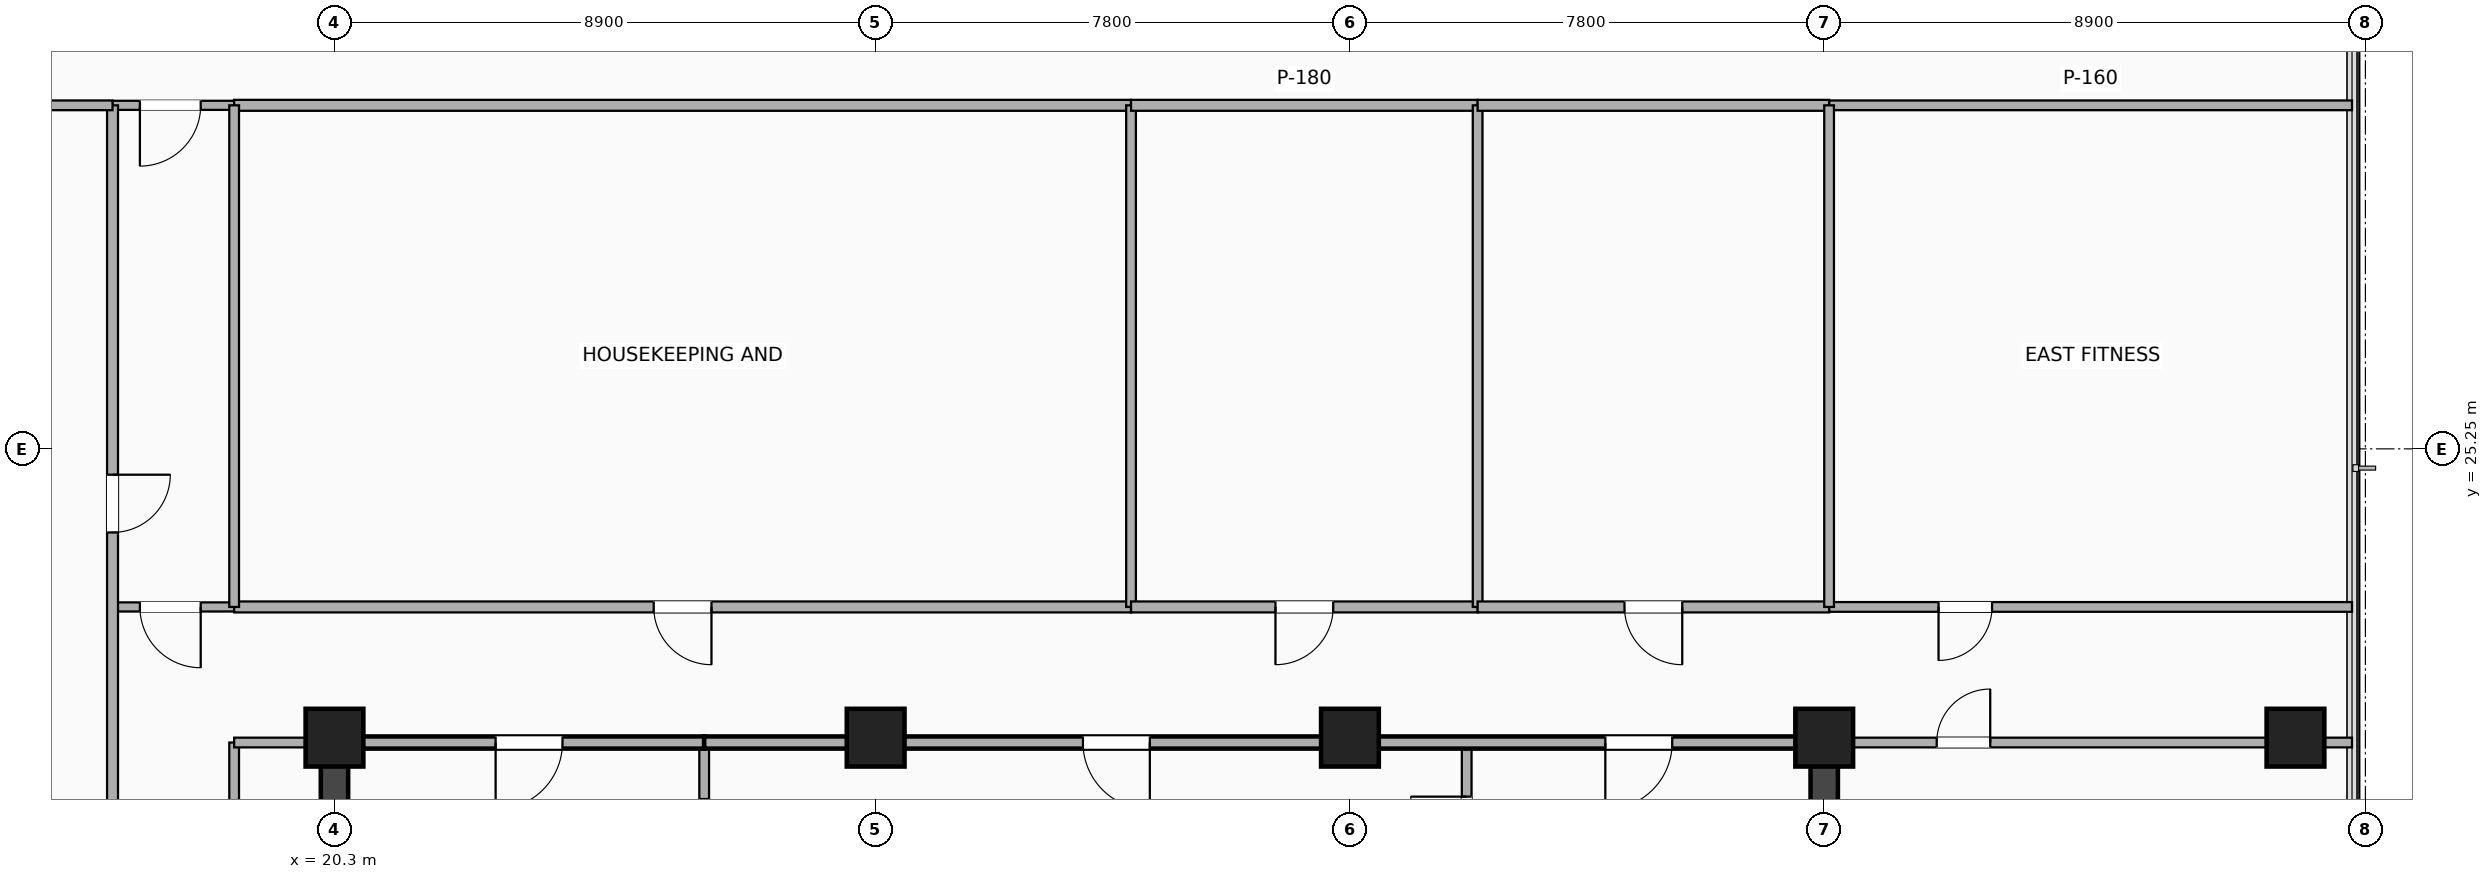
"""IFC4 building model, lengths in metres.
Left out: names, types, materials, properties, quantities, classifications, styles, units other than length and angle.
Written with IfcOpenShell. Run it as: python <this file> out.ifc"""

import sys

from ifc_helpers import new_model, si_unit, direction, frame, frame_2d, origin, origin_2d, place, context, subcontext, project, spatial, rectangle, extrude, element, fill, save


model = new_model("IFC4")
c1 = context("Model", 3, precision=1e-05, world=origin(), true_north=direction((0.0, 1.0)))
c2 = subcontext(c1, "Body", "Model", "MODEL_VIEW")
j1 = project(units=[si_unit("LENGTHUNIT", "METRE"), si_unit("PLANEANGLEUNIT", "RADIAN")], contexts=[c1])
p1 = place(None, origin())
s1 = spatial("IfcSite", under=j1, at=p1, CompositionType="ELEMENT")
p2 = place(p1, origin())
s2 = spatial("IfcBuilding", under=s1, at=p2, CompositionType="ELEMENT")
p3 = place(p2, frame((0.0, 0.0, 224.9)))
s3 = spatial("IfcBuildingStorey", under=s2, at=p3, CompositionType="ELEMENT", Elevation=224.9)
for number, where, z_axis, x_axis in (
    (1, (20.3, 3.5, 0.0), (0.0, 0.0, 1.0), (0.0, 1.0, 0.0)),
    (2, (44.8, 3.5, 0.0), (0.0, 0.0, 1.0), (0.0, 1.0, 0.0)),
):
    element("IfcWall", number, at=place(p3, frame(where, z_axis=z_axis, x_axis=x_axis)), inside=s3, PredefinedType="SHEAR", context=c2, shape_type="SweptSolid", body=[
        extrude(rectangle(XDim=16.9, YDim=0.45, at=frame_2d((8.45, 0.0))), origin(), (0.0, 0.0, 1.0), 3.26),
    ])
for number, where, z_axis, x_axis in (
    (3, (20.3, 20.5, -0.24), (0.0, 0.0, 1.0), (1.0, 0.0, 0.0)),
    (4, (29.2, 20.5, -0.24), (0.0, 0.0, 1.0), (1.0, 0.0, 0.0)),
    (5, (37.0, 20.5, -0.24), (0.0, 0.0, 1.0), (1.0, 0.0, 0.0)),
    (6, (44.8, 20.5, -0.24), (0.0, 0.0, 1.0), (1.0, 0.0, 0.0)),
    (7, (52.55, 20.5, -0.24), (0.0, 0.0, 1.0), (1.0, 0.0, 0.0)),
):
    element("IfcColumn", number, at=place(p3, frame(where, z_axis=z_axis, x_axis=x_axis)), inside=s3, PredefinedType="COLUMN", context=c2, shape_type="SweptSolid", body=[
        extrude(rectangle(XDim=0.95, YDim=0.95, at=origin_2d()), origin(), (0.0, 0.0, 1.0), 3.5),
    ])
p4 = place(p3, frame((26.38, 17.76, 0.0), z_axis=(0.0, 0.0, 1.0), x_axis=(0.0, 1.0, 0.0)))
e8 = element("IfcWall", 8, at=p4, inside=s3, PredefinedType="PARTITIONING", context=c2, shape_type="SweptSolid", body=[
    extrude(rectangle(XDim=2.66, YDim=0.16, at=frame_2d((1.33, 0.0))), origin(), (0.0, 0.0, 1.0), 2.706),
])
p5 = place(p4, frame((0.85, 0.0, 0.0)))
e9 = element("IfcOpeningElement", 9, at=p5, cuts=e8, PredefinedType="OPENING", context=c2, shape_type="SweptSolid", body=[
    extrude(rectangle(XDim=0.88, YDim=2.08, at=frame_2d((0.44, 1.04))), frame((0.0, 0.09, 0.0), z_axis=(0.0, -1.0, 0.0), x_axis=(1.0, 0.0, 0.0)), (0.0, 0.0, 1.0), 0.18),
])
p6 = place(p3, frame((38.92, 17.76, 0.0), z_axis=(0.0, 0.0, 1.0), x_axis=(0.0, 1.0, 0.0)))
e10 = element("IfcWall", 10, at=p6, inside=s3, PredefinedType="PARTITIONING", context=c2, shape_type="SweptSolid", body=[
    extrude(rectangle(XDim=2.66, YDim=0.16, at=frame_2d((1.33, 0.0))), origin(), (0.0, 0.0, 1.0), 2.706),
])
p7 = place(p6, frame((1.77, 0.0, 0.0), z_axis=(0.0, 0.0, 1.0), x_axis=(-1.0, 0.0, 0.0)))
e11 = element("IfcOpeningElement", 11, at=p7, cuts=e10, PredefinedType="OPENING", context=c2, shape_type="SweptSolid", body=[
    extrude(rectangle(XDim=0.92, YDim=2.08, at=frame_2d((0.46, 1.04))), frame((0.0, 0.09, 0.0), z_axis=(0.0, -1.0, 0.0), x_axis=(1.0, 0.0, 0.0)), (0.0, 0.0, 1.0), 0.18),
])
p8 = place(p3, frame((20.65, 20.42, 0.0), z_axis=(0.0, 0.0, 1.0), x_axis=(1.0, 0.0, 0.0)))
e12 = element("IfcWall", 12, at=p8, inside=s3, PredefinedType="PARTITIONING", context=c2, shape_type="SweptSolid", body=[
    extrude(rectangle(XDim=5.73, YDim=0.2, at=frame_2d((2.865, 0.0))), origin(), (0.0, 0.0, 1.0), 2.472),
])
p9 = place(p8, frame((2.3, 0.0, 0.0)))
e13 = element("IfcOpeningElement", 13, at=p9, cuts=e12, PredefinedType="OPENING", context=c2, shape_type="SweptSolid", body=[
    extrude(rectangle(XDim=1.1, YDim=2.15, at=frame_2d((0.55, 1.075))), frame((0.0, 0.11, 0.0), z_axis=(0.0, -1.0, 0.0), x_axis=(1.0, 0.0, 0.0)), (0.0, 0.0, 1.0), 0.22),
])
p10 = place(p3, frame((26.38, 20.42, 0.0), z_axis=(0.0, 0.0, 1.0), x_axis=(1.0, 0.0, 0.0)))
e14 = element("IfcWall", 14, at=p10, inside=s3, PredefinedType="PARTITIONING", context=c2, shape_type="SweptSolid", body=[
    extrude(rectangle(XDim=2.82, YDim=0.2, at=frame_2d((1.41, 0.0))), origin(), (0.0, 0.0, 1.0), 2.472),
])
p11 = place(p3, frame((29.2, 20.42, 0.0), z_axis=(0.0, 0.0, 1.0), x_axis=(1.0, 0.0, 0.0)))
e15 = element("IfcWall", 15, at=p11, inside=s3, PredefinedType="PARTITIONING", context=c2, shape_type="SweptSolid", body=[
    extrude(rectangle(XDim=7.8, YDim=0.2, at=frame_2d((3.9, 0.0))), origin(), (0.0, 0.0, 1.0), 2.472),
])
p12 = place(p11, frame((3.409, 0.0, 0.0)))
e16 = element("IfcOpeningElement", 16, at=p12, cuts=e15, PredefinedType="OPENING", context=c2, shape_type="SweptSolid", body=[
    extrude(rectangle(XDim=1.1, YDim=2.15, at=frame_2d((0.55, 1.075))), frame((0.0, 0.11, 0.0), z_axis=(0.0, -1.0, 0.0), x_axis=(1.0, 0.0, 0.0)), (0.0, 0.0, 1.0), 0.22),
])
p13 = place(p3, frame((37.0, 20.42, 0.0), z_axis=(0.0, 0.0, 1.0), x_axis=(1.0, 0.0, 0.0)))
e17 = element("IfcWall", 17, at=p13, inside=s3, PredefinedType="PARTITIONING", context=c2, shape_type="SweptSolid", body=[
    extrude(rectangle(XDim=7.45, YDim=0.2, at=frame_2d((3.725, 0.0))), origin(), (0.0, 0.0, 1.0), 2.472),
])
p14 = place(p13, frame((4.2, 0.0, 0.0)))
e18 = element("IfcOpeningElement", 18, at=p14, cuts=e17, PredefinedType="OPENING", context=c2, shape_type="SweptSolid", body=[
    extrude(rectangle(XDim=1.1, YDim=2.15, at=frame_2d((0.55, 1.075))), frame((0.0, 0.11, 0.0), z_axis=(0.0, -1.0, 0.0), x_axis=(1.0, 0.0, 0.0)), (0.0, 0.0, 1.0), 0.22),
])
p15 = place(p3, frame((18.65, 15.65, 0.0), z_axis=(0.0, 0.0, 1.0), x_axis=(0.0, 1.0, 0.0)))
e19 = element("IfcWall", 19, at=p15, inside=s3, PredefinedType="PARTITIONING", context=c2, shape_type="SweptSolid", body=[
    extrude(rectangle(XDim=4.77, YDim=0.16, at=frame_2d((2.385, 0.0))), origin(), (0.0, 0.0, 1.0), 2.472),
])
p16 = place(p15, frame((1.28, 0.0, 0.0), z_axis=(0.0, 0.0, 1.0), x_axis=(-1.0, 0.0, 0.0)))
e20 = element("IfcOpeningElement", 20, at=p16, cuts=e19, PredefinedType="OPENING", context=c2, shape_type="SweptSolid", body=[
    extrude(rectangle(XDim=0.88, YDim=2.08, at=frame_2d((0.44, 1.04))), frame((0.0, 0.09, 0.0), z_axis=(0.0, -1.0, 0.0), x_axis=(1.0, 0.0, 0.0)), (0.0, 0.0, 1.0), 0.18),
])
p17 = place(p3, frame((18.65, 20.42, 0.0), z_axis=(0.0, 0.0, 1.0), x_axis=(1.0, 0.0, 0.0)))
e21 = element("IfcWall", 21, at=p17, inside=s3, PredefinedType="PARTITIONING", context=c2, shape_type="SweptSolid", body=[
    extrude(rectangle(XDim=1.65, YDim=0.16, at=frame_2d((0.825, 0.0))), origin(), (0.0, 0.0, 1.0), 2.472),
])
p18 = place(p3, frame((16.65, 22.65, 0.0), z_axis=(0.0, 0.0, 1.0), x_axis=(1.0, 0.0, 0.0)))
e22 = element("IfcWall", 22, at=p18, inside=s3, PredefinedType="PARTITIONING", context=c2, shape_type="SweptSolid", body=[
    extrude(rectangle(XDim=2.0, YDim=0.15, at=frame_2d((1.0, 0.0))), origin(), (0.0, 0.0, 1.0), 3.26),
])
p19 = place(p18, frame((0.45, 0.0, 0.0)))
e23 = element("IfcOpeningElement", 23, at=p19, cuts=e22, PredefinedType="OPENING", context=c2, shape_type="SweptSolid", body=[
    extrude(rectangle(XDim=1.0, YDim=2.15, at=frame_2d((0.5, 1.075))), frame((0.0, 0.085, 0.0), z_axis=(0.0, -1.0, 0.0), x_axis=(1.0, 0.0, 0.0)), (0.0, 0.0, 1.0), 0.17),
])
p20 = place(p3, frame((16.65, 30.9, 0.0), z_axis=(0.0, 0.0, 1.0), x_axis=(1.0, 0.0, 0.0)))
e24 = element("IfcWall", 24, at=p20, inside=s3, PredefinedType="PARTITIONING", context=c2, shape_type="SweptSolid", body=[
    extrude(rectangle(XDim=2.0, YDim=0.15, at=frame_2d((1.0, 0.0))), origin(), (0.0, 0.0, 1.0), 3.26),
])
p21 = place(p20, frame((0.45, 0.0, 0.0)))
e25 = element("IfcOpeningElement", 25, at=p21, cuts=e24, PredefinedType="OPENING", context=c2, shape_type="SweptSolid", body=[
    extrude(rectangle(XDim=1.0, YDim=2.15, at=frame_2d((0.5, 1.075))), frame((0.0, 0.085, 0.0), z_axis=(0.0, -1.0, 0.0), x_axis=(1.0, 0.0, 0.0)), (0.0, 0.0, 1.0), 0.17),
])
p22 = place(p3, frame((44.8, 20.42, 0.0), z_axis=(0.0, 0.0, 1.0), x_axis=(1.0, 0.0, 0.0)))
e26 = element("IfcWall", 26, at=p22, inside=s3, PredefinedType="PARTITIONING", context=c2, shape_type="SweptSolid", body=[
    extrude(rectangle(XDim=8.68, YDim=0.16, at=frame_2d((4.34, 0.0))), origin(), (0.0, 0.0, 1.0), 2.472),
])
p23 = place(p22, frame((2.73, 0.0, 0.0), z_axis=(0.0, 0.0, 1.0), x_axis=(-1.0, 0.0, 0.0)))
e27 = element("IfcOpeningElement", 27, at=p23, cuts=e26, PredefinedType="OPENING", context=c2, shape_type="SweptSolid", body=[
    extrude(rectangle(XDim=0.88, YDim=2.08, at=frame_2d((0.44, 1.04))), frame((0.0, 0.09, 0.0), z_axis=(0.0, -1.0, 0.0), x_axis=(1.0, 0.0, 0.0)), (0.0, 0.0, 1.0), 0.18),
])
p24 = place(p3, frame((44.88, 22.65, 0.0), z_axis=(0.0, 0.0, 1.0), x_axis=(1.0, 0.0, 0.0)))
e28 = element("IfcWall", 28, at=p24, inside=s3, PredefinedType="PARTITIONING", context=c2, shape_type="SweptSolid", body=[
    extrude(rectangle(XDim=8.6, YDim=0.16, at=frame_2d((4.3, 0.0))), origin(), (0.0, 0.0, 1.0), 2.472),
])
p25 = place(p24, frame((1.8, 0.0, 0.0)))
e29 = element("IfcOpeningElement", 29, at=p25, cuts=e28, PredefinedType="OPENING", context=c2, shape_type="SweptSolid", body=[
    extrude(rectangle(XDim=0.88, YDim=2.08, at=frame_2d((0.44, 1.04))), frame((0.0, 0.09, 0.0), z_axis=(0.0, -1.0, 0.0), x_axis=(1.0, 0.0, 0.0)), (0.0, 0.0, 1.0), 0.18),
])
p26 = place(p3, frame((44.88, 30.9, 0.0), z_axis=(0.0, 0.0, 1.0), x_axis=(1.0, 0.0, 0.0)))
e30 = element("IfcWall", 30, at=p26, inside=s3, PredefinedType="PARTITIONING", context=c2, shape_type="SweptSolid", body=[
    extrude(rectangle(XDim=8.6, YDim=0.16, at=frame_2d((4.3, 0.0))), origin(), (0.0, 0.0, 1.0), 2.472),
])
p27 = place(p3, frame((18.65, 22.65, 0.0), z_axis=(0.0, 0.0, 1.0), x_axis=(1.0, 0.0, 0.0)))
e31 = element("IfcWall", 31, at=p27, inside=s3, PredefinedType="PARTITIONING", context=c2, shape_type="SweptSolid", body=[
    extrude(rectangle(XDim=14.75, YDim=0.18, at=frame_2d((7.375, 0.0))), origin(), (0.0, 0.0, 1.0), 2.472),
])
p28 = place(p27, frame((6.9, 0.0, 0.0)))
e32 = element("IfcOpeningElement", 32, at=p28, cuts=e31, PredefinedType="OPENING", context=c2, shape_type="SweptSolid", body=[
    extrude(rectangle(XDim=0.95, YDim=2.15, at=frame_2d((0.475, 1.075))), frame((0.0, 0.1, 0.0), z_axis=(0.0, -1.0, 0.0), x_axis=(1.0, 0.0, 0.0)), (0.0, 0.0, 1.0), 0.2),
])
p29 = place(p3, frame((18.65, 30.9, 0.0), z_axis=(0.0, 0.0, 1.0), x_axis=(1.0, 0.0, 0.0)))
e33 = element("IfcWall", 33, at=p29, inside=s3, PredefinedType="PARTITIONING", context=c2, shape_type="SweptSolid", body=[
    extrude(rectangle(XDim=14.75, YDim=0.18, at=frame_2d((7.375, 0.0))), origin(), (0.0, 0.0, 1.0), 2.472),
])
for number, where, z_axis, x_axis in (
    (34, (18.65, 22.65, 0.0), (0.0, 0.0, 1.0), (0.0, 1.0, 0.0)),
    (35, (33.4, 22.65, 0.0), (0.0, 0.0, 1.0), (0.0, 1.0, 0.0)),
):
    element("IfcWall", number, at=place(p3, frame(where, z_axis=z_axis, x_axis=x_axis)), inside=s3, PredefinedType="PARTITIONING", context=c2, shape_type="SweptSolid", body=[
        extrude(rectangle(XDim=8.25, YDim=0.16, at=frame_2d((4.125, 0.0))), origin(), (0.0, 0.0, 1.0), 2.887),
    ])
p30 = place(p3, frame((33.4, 22.65, 0.0), z_axis=(0.0, 0.0, 1.0), x_axis=(1.0, 0.0, 0.0)))
e36 = element("IfcWall", 36, at=p30, inside=s3, PredefinedType="PARTITIONING", context=c2, shape_type="SweptSolid", body=[
    extrude(rectangle(XDim=5.7, YDim=0.18, at=frame_2d((2.85, 0.0))), origin(), (0.0, 0.0, 1.0), 2.472),
])
p31 = place(p30, frame((2.375, 0.0, 0.0)))
e37 = element("IfcOpeningElement", 37, at=p31, cuts=e36, PredefinedType="OPENING", context=c2, shape_type="SweptSolid", body=[
    extrude(rectangle(XDim=0.95, YDim=2.15, at=frame_2d((0.475, 1.075))), frame((0.0, 0.1, 0.0), z_axis=(0.0, -1.0, 0.0), x_axis=(1.0, 0.0, 0.0)), (0.0, 0.0, 1.0), 0.2),
])
p32 = place(p3, frame((33.4, 30.9, 0.0), z_axis=(0.0, 0.0, 1.0), x_axis=(1.0, 0.0, 0.0)))
e38 = element("IfcWall", 38, at=p32, inside=s3, PredefinedType="PARTITIONING", context=c2, shape_type="SweptSolid", body=[
    extrude(rectangle(XDim=5.7, YDim=0.18, at=frame_2d((2.85, 0.0))), origin(), (0.0, 0.0, 1.0), 2.472),
])
p33 = place(p3, frame((39.1, 22.65, 0.0), z_axis=(0.0, 0.0, 1.0), x_axis=(0.0, 1.0, 0.0)))
e39 = element("IfcWall", 39, at=p33, inside=s3, PredefinedType="PARTITIONING", context=c2, shape_type="SweptSolid", body=[
    extrude(rectangle(XDim=8.25, YDim=0.16, at=frame_2d((4.125, 0.0))), origin(), (0.0, 0.0, 1.0), 2.887),
])
p34 = place(p3, frame((39.1, 22.65, 0.0), z_axis=(0.0, 0.0, 1.0), x_axis=(1.0, 0.0, 0.0)))
e40 = element("IfcWall", 40, at=p34, inside=s3, PredefinedType="PARTITIONING", context=c2, shape_type="SweptSolid", body=[
    extrude(rectangle(XDim=5.78, YDim=0.18, at=frame_2d((2.89, 0.0))), origin(), (0.0, 0.0, 1.0), 2.472),
])
p35 = place(p34, frame((2.415, 0.0, 0.0)))
e41 = element("IfcOpeningElement", 41, at=p35, cuts=e40, PredefinedType="OPENING", context=c2, shape_type="SweptSolid", body=[
    extrude(rectangle(XDim=0.95, YDim=2.15, at=frame_2d((0.475, 1.075))), frame((0.0, 0.1, 0.0), z_axis=(0.0, -1.0, 0.0), x_axis=(1.0, 0.0, 0.0)), (0.0, 0.0, 1.0), 0.2),
])
p36 = place(p3, frame((39.1, 30.9, 0.0), z_axis=(0.0, 0.0, 1.0), x_axis=(1.0, 0.0, 0.0)))
e42 = element("IfcWall", 42, at=p36, inside=s3, PredefinedType="PARTITIONING", context=c2, shape_type="SweptSolid", body=[
    extrude(rectangle(XDim=5.78, YDim=0.18, at=frame_2d((2.89, 0.0))), origin(), (0.0, 0.0, 1.0), 2.472),
])
p37 = place(p3, frame((44.88, 22.65, 0.0), z_axis=(0.0, 0.0, 1.0), x_axis=(0.0, 1.0, 0.0)))
e43 = element("IfcWall", 43, at=p37, inside=s3, PredefinedType="PARTITIONING", context=c2, shape_type="SweptSolid", body=[
    extrude(rectangle(XDim=8.25, YDim=0.16, at=frame_2d((4.125, 0.0))), origin(), (0.0, 0.0, 1.0), 2.472),
])
p38 = place(p3, frame((16.65, 17.8, 0.0), z_axis=(0.0, 0.0, 1.0), x_axis=(0.0, 1.0, 0.0)))
e44 = element("IfcWall", 44, at=p38, inside=s3, PredefinedType="PARTITIONING", context=c2, shape_type="SweptSolid", body=[
    extrude(rectangle(XDim=13.1, YDim=0.18, at=frame_2d((6.55, 0.0))), origin(), (0.0, 0.0, 1.0), 2.472),
])
p39 = place(p38, frame((6.075, 0.0, 0.0)))
e45 = element("IfcOpeningElement", 45, at=p39, cuts=e44, PredefinedType="OPENING", context=c2, shape_type="SweptSolid", body=[
    extrude(rectangle(XDim=0.95, YDim=2.15, at=frame_2d((0.475, 1.075))), frame((0.0, 0.1, 0.0), z_axis=(0.0, -1.0, 0.0), x_axis=(1.0, 0.0, 0.0)), (0.0, 0.0, 1.0), 0.2),
])
p40 = place(p3, frame((11.47, 30.9, 0.0), z_axis=(0.0, 0.0, 1.0), x_axis=(1.0, 0.0, 0.0)))
e46 = element("IfcWall", 46, at=p40, inside=s3, PredefinedType="PARTITIONING", context=c2, shape_type="SweptSolid", body=[
    extrude(rectangle(XDim=5.18, YDim=0.16, at=frame_2d((2.59, 0.0))), origin(), (0.0, 0.0, 1.0), 2.782),
])
p41 = place(p7, origin())
e47 = element("IfcDoor", 47, at=p41, inside=s3, OperationType="SINGLE_SWING_RIGHT", PredefinedType="DOOR", context=c2, shape_type="SweptSolid", body=[
    extrude(rectangle(XDim=0.92, YDim=2.08, at=frame_2d((0.46, 1.04))), frame((0.0, 0.025, 0.0), z_axis=(0.0, -1.0, 0.0), x_axis=(1.0, 0.0, 0.0)), (0.0, 0.0, 1.0), 0.05),
])
fill(e11, e47)
p42 = place(p9, origin())
e48 = element("IfcDoor", 48, at=p42, inside=s3, OperationType="SINGLE_SWING_LEFT", PredefinedType="DOOR", context=c2, shape_type="SweptSolid", body=[
    extrude(rectangle(XDim=1.1, YDim=2.15, at=frame_2d((0.55, 1.075))), frame((0.0, 0.025, 0.0), z_axis=(0.0, -1.0, 0.0), x_axis=(1.0, 0.0, 0.0)), (0.0, 0.0, 1.0), 0.05),
])
fill(e13, e48)
p43 = place(p12, origin())
e49 = element("IfcDoor", 49, at=p43, inside=s3, OperationType="SINGLE_SWING_RIGHT", PredefinedType="DOOR", context=c2, shape_type="SweptSolid", body=[
    extrude(rectangle(XDim=1.1, YDim=2.15, at=frame_2d((0.55, 1.075))), frame((0.0, 0.025, 0.0), z_axis=(0.0, -1.0, 0.0), x_axis=(1.0, 0.0, 0.0)), (0.0, 0.0, 1.0), 0.05),
])
fill(e16, e49)
p44 = place(p14, origin())
e50 = element("IfcDoor", 50, at=p44, inside=s3, OperationType="SINGLE_SWING_LEFT", PredefinedType="DOOR", context=c2, shape_type="SweptSolid", body=[
    extrude(rectangle(XDim=1.1, YDim=2.15, at=frame_2d((0.55, 1.075))), frame((0.0, 0.025, 0.0), z_axis=(0.0, -1.0, 0.0), x_axis=(1.0, 0.0, 0.0)), (0.0, 0.0, 1.0), 0.05),
])
fill(e18, e50)
p45 = place(p19, origin())
e51 = element("IfcDoor", 51, at=p45, inside=s3, OperationType="SINGLE_SWING_RIGHT", PredefinedType="DOOR", context=c2, shape_type="SweptSolid", body=[
    extrude(rectangle(XDim=1.0, YDim=2.15, at=frame_2d((0.5, 1.075))), frame((0.0, 0.025, 0.0), z_axis=(0.0, -1.0, 0.0), x_axis=(1.0, 0.0, 0.0)), (0.0, 0.0, 1.0), 0.05),
])
fill(e23, e51)
p46 = place(p21, origin())
e52 = element("IfcDoor", 52, at=p46, inside=s3, OperationType="SINGLE_SWING_LEFT", PredefinedType="DOOR", context=c2, shape_type="SweptSolid", body=[
    extrude(rectangle(XDim=1.0, YDim=2.15, at=frame_2d((0.5, 1.075))), frame((0.0, 0.025, 0.0), z_axis=(0.0, -1.0, 0.0), x_axis=(1.0, 0.0, 0.0)), (0.0, 0.0, 1.0), 0.05),
])
fill(e25, e52)
p47 = place(p23, origin())
e53 = element("IfcDoor", 53, at=p47, inside=s3, OperationType="SINGLE_SWING_RIGHT", PredefinedType="DOOR", context=c2, shape_type="SweptSolid", body=[
    extrude(rectangle(XDim=0.88, YDim=2.08, at=frame_2d((0.44, 1.04))), frame((0.0, 0.025, 0.0), z_axis=(0.0, -1.0, 0.0), x_axis=(1.0, 0.0, 0.0)), (0.0, 0.0, 1.0), 0.05),
])
fill(e27, e53)
p48 = place(p25, origin())
e54 = element("IfcDoor", 54, at=p48, inside=s3, OperationType="SINGLE_SWING_LEFT", PredefinedType="DOOR", context=c2, shape_type="SweptSolid", body=[
    extrude(rectangle(XDim=0.88, YDim=2.08, at=frame_2d((0.44, 1.04))), frame((0.0, 0.025, 0.0), z_axis=(0.0, -1.0, 0.0), x_axis=(1.0, 0.0, 0.0)), (0.0, 0.0, 1.0), 0.05),
])
fill(e29, e54)
p49 = place(p28, origin())
e55 = element("IfcDoor", 55, at=p49, inside=s3, OperationType="SINGLE_SWING_RIGHT", PredefinedType="DOOR", context=c2, shape_type="SweptSolid", body=[
    extrude(rectangle(XDim=0.95, YDim=2.15, at=frame_2d((0.475, 1.075))), frame((0.0, 0.025, 0.0), z_axis=(0.0, -1.0, 0.0), x_axis=(1.0, 0.0, 0.0)), (0.0, 0.0, 1.0), 0.05),
])
fill(e32, e55)
p50 = place(p31, origin())
e56 = element("IfcDoor", 56, at=p50, inside=s3, OperationType="SINGLE_SWING_LEFT", PredefinedType="DOOR", context=c2, shape_type="SweptSolid", body=[
    extrude(rectangle(XDim=0.95, YDim=2.15, at=frame_2d((0.475, 1.075))), frame((0.0, 0.025, 0.0), z_axis=(0.0, -1.0, 0.0), x_axis=(1.0, 0.0, 0.0)), (0.0, 0.0, 1.0), 0.05),
])
fill(e37, e56)
p51 = place(p35, origin())
e57 = element("IfcDoor", 57, at=p51, inside=s3, OperationType="SINGLE_SWING_RIGHT", PredefinedType="DOOR", context=c2, shape_type="SweptSolid", body=[
    extrude(rectangle(XDim=0.95, YDim=2.15, at=frame_2d((0.475, 1.075))), frame((0.0, 0.025, 0.0), z_axis=(0.0, -1.0, 0.0), x_axis=(1.0, 0.0, 0.0)), (0.0, 0.0, 1.0), 0.05),
])
fill(e41, e57)
p52 = place(p39, origin())
e58 = element("IfcDoor", 58, at=p52, inside=s3, OperationType="SINGLE_SWING_RIGHT", PredefinedType="DOOR", context=c2, shape_type="SweptSolid", body=[
    extrude(rectangle(XDim=0.95, YDim=2.15, at=frame_2d((0.475, 1.075))), frame((0.0, 0.025, 0.0), z_axis=(0.0, -1.0, 0.0), x_axis=(1.0, 0.0, 0.0)), (0.0, 0.0, 1.0), 0.05),
])
fill(e45, e58)
save(model, sys.argv[1])
